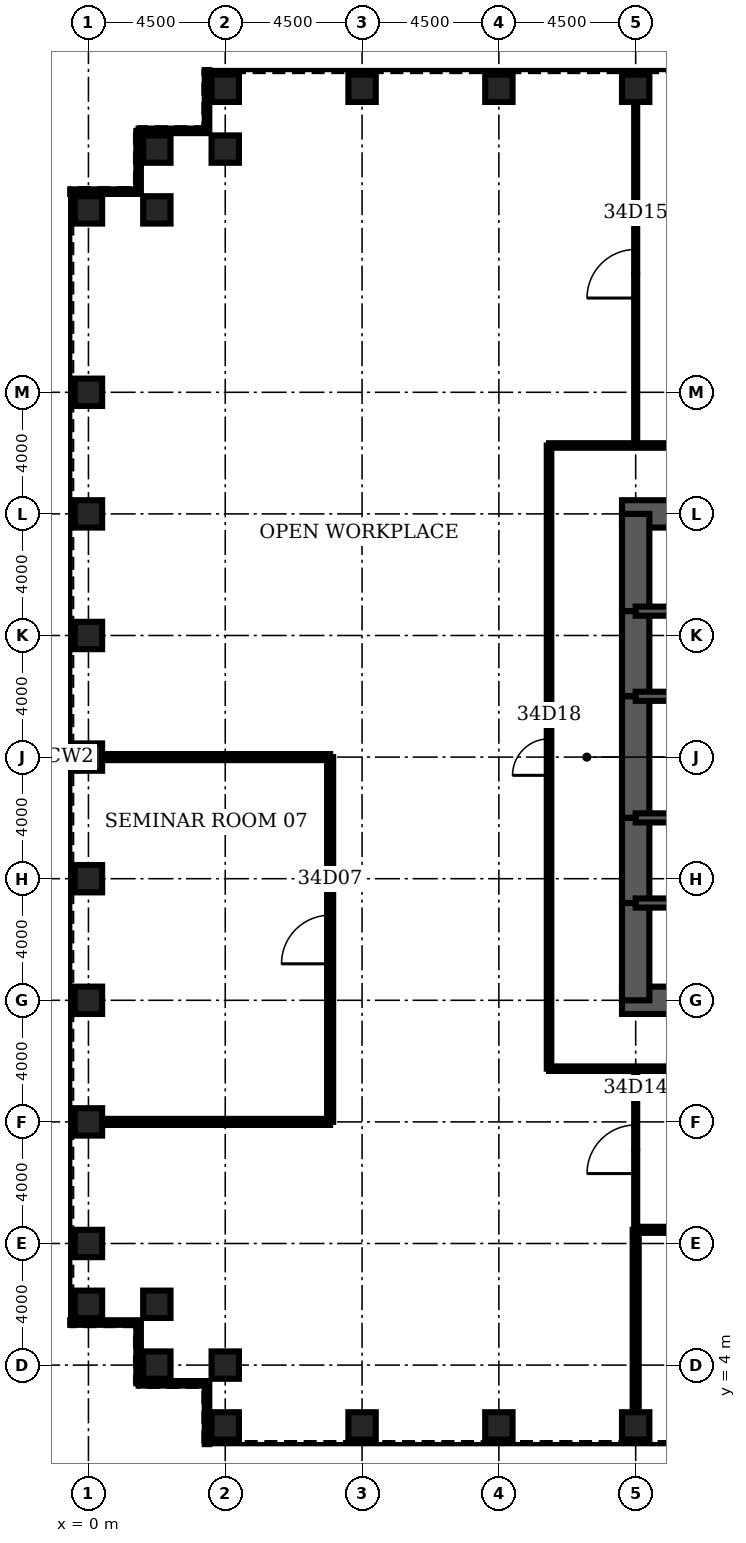
"""IFC4 building model, lengths in metres.
Left out: names, types, materials, properties, quantities, classifications, styles, units other than length and angle.
Written with IfcOpenShell. Run it as: python <this file> out.ifc"""

import sys

from ifc_helpers import new_model, si_unit, direction, frame, frame_2d, origin, origin_2d, place, context, subcontext, project, spatial, rectangle, hollow_rectangle, extrude, element, fill, save


model = new_model("IFC4")
c1 = context("Model", 3, precision=1e-05, world=origin(), true_north=direction((0.0, 1.0)))
c2 = subcontext(c1, "Body", "Model", "MODEL_VIEW")
j1 = project(units=[si_unit("LENGTHUNIT", "METRE"), si_unit("PLANEANGLEUNIT", "RADIAN")], contexts=[c1])
p1 = place(None, origin())
s1 = spatial("IfcSite", under=j1, at=p1, CompositionType="ELEMENT")
p2 = place(p1, origin())
s2 = spatial("IfcBuilding", under=s1, at=p2, CompositionType="ELEMENT")
p3 = place(p2, frame((0.0, 0.0, 155.1)))
s3 = spatial("IfcBuildingStorey", under=s2, at=p3, CompositionType="ELEMENT", Elevation=155.1)
for number, where, z_axis, x_axis in (
    (1, (4.5, 2.0, 0.0), (0.0, 0.0, 1.0), (0.0, 1.0, 0.0)),
    (2, (9.0, 2.0, 0.0), (0.0, 0.0, 1.0), (0.0, 1.0, 0.0)),
    (3, (13.5, 2.0, 0.0), (0.0, 0.0, 1.0), (0.0, 1.0, 0.0)),
    (4, (18.0, 2.0, 0.0), (0.0, 0.0, 1.0), (0.0, 1.0, 0.0)),
    (5, (18.0, 46.0, 0.0), (0.0, 0.0, 1.0), (0.0, 1.0, 0.0)),
    (6, (13.5, 46.0, 0.0), (0.0, 0.0, 1.0), (0.0, 1.0, 0.0)),
    (7, (9.0, 46.0, 0.0), (0.0, 0.0, 1.0), (0.0, 1.0, 0.0)),
    (8, (4.5, 46.0, 0.0), (0.0, 0.0, 1.0), (0.0, 1.0, 0.0)),
    (9, (4.5, 44.0, 0.0), (0.0, 0.0, 1.0), (0.0, 1.0, 0.0)),
    (10, (2.25, 44.0, 0.0), (0.0, 0.0, 1.0), (1.0, 0.0, 0.0)),
    (11, (2.25, 42.0, 0.0), (0.0, 0.0, 1.0), (1.0, 0.0, 0.0)),
    (12, (0.0, 42.0, 0.0), (0.0, 0.0, 1.0), (1.0, 0.0, 0.0)),
    (13, (0.0, 36.0, 0.0), (0.0, 0.0, 1.0), (1.0, 0.0, 0.0)),
    (14, (0.0, 32.0, 0.0), (0.0, 0.0, 1.0), (1.0, 0.0, 0.0)),
    (15, (0.0, 28.0, 0.0), (0.0, 0.0, 1.0), (1.0, 0.0, 0.0)),
    (16, (0.0, 24.0, 0.0), (0.0, 0.0, 1.0), (1.0, 0.0, 0.0)),
    (17, (0.0, 20.0, 0.0), (0.0, 0.0, 1.0), (1.0, 0.0, 0.0)),
    (18, (0.0, 16.0, 0.0), (0.0, 0.0, 1.0), (1.0, 0.0, 0.0)),
    (19, (0.0, 12.0, 0.0), (0.0, 0.0, 1.0), (1.0, 0.0, 0.0)),
    (20, (0.0, 8.0, 0.0), (0.0, 0.0, 1.0), (1.0, 0.0, 0.0)),
    (21, (0.0, 6.0, 0.0), (0.0, 0.0, 1.0), (1.0, 0.0, 0.0)),
    (22, (2.25, 6.0, 0.0), (0.0, 0.0, 1.0), (1.0, 0.0, 0.0)),
    (23, (2.25, 4.0, 0.0), (0.0, 0.0, 1.0), (1.0, 0.0, 0.0)),
    (24, (4.5, 4.0, 0.0), (0.0, 0.0, 1.0), (0.0, 1.0, 0.0)),
):
    element("IfcColumn", number, at=place(p3, frame(where, z_axis=z_axis, x_axis=x_axis)), inside=s3, PredefinedType="COLUMN", context=c2, shape_type="SweptSolid", body=[
        extrude(hollow_rectangle(XDim=0.9, YDim=0.9, WallThickness=0.1, at=origin_2d()), origin(), (0.0, 0.0, 1.0), 4.2),
    ])
for number, where, z_axis, x_axis in (
    (25, (17.55, 16.0, 0.0), (0.0, 0.0, 1.0), (1.0, 0.0, 0.0)),
    (26, (27.0, 32.0, 0.0), (0.0, 0.0, 1.0), (-1.0, 0.0, 0.0)),
):
    element("IfcWall", number, at=place(p3, frame(where, z_axis=z_axis, x_axis=x_axis)), inside=s3, PredefinedType="SHEAR", context=c2, shape_type="SweptSolid", body=[
        extrude(rectangle(XDim=9.45, YDim=0.9, at=frame_2d((4.725, 0.0))), origin(), (0.0, 0.0, 1.0), 4.2),
    ])
p4 = place(p3, frame((18.0, 32.0, 0.0), z_axis=(0.0, 0.0, 1.0), x_axis=(0.0, -1.0, 0.0)))
e27 = element("IfcWall", 27, at=p4, inside=s3, PredefinedType="SHEAR", context=c2, shape_type="SweptSolid", body=[
    extrude(rectangle(XDim=3.2, YDim=0.9, at=frame_2d((1.6, 0.0))), origin(), (0.0, 0.0, 1.0), 4.2),
])
p5 = place(p3, frame((18.0, 28.8, 0.0), z_axis=(0.0, 0.0, 1.0), x_axis=(0.0, -1.0, 0.0)))
e28 = element("IfcWall", 28, at=p5, inside=s3, PredefinedType="SHEAR", context=c2, shape_type="SweptSolid", body=[
    extrude(rectangle(XDim=2.8, YDim=0.9, at=frame_2d((1.4, 0.0))), origin(), (0.0, 0.0, 1.0), 4.2),
])
p6 = place(p5, frame((0.4, 0.0, 0.0)))
e29 = element("IfcOpeningElement", 29, at=p6, cuts=e28, PredefinedType="OPENING", context=c2, shape_type="SweptSolid", body=[
    extrude(rectangle(XDim=1.8, YDim=2.1, at=frame_2d((0.9, 1.05))), frame((0.0, 0.46, 0.0), z_axis=(0.0, -1.0, 0.0), x_axis=(1.0, 0.0, 0.0)), (0.0, 0.0, 1.0), 0.92),
])
p7 = place(p3, frame((18.0, 26.0, 0.0), z_axis=(0.0, 0.0, 1.0), x_axis=(0.0, -1.0, 0.0)))
e30 = element("IfcWall", 30, at=p7, inside=s3, PredefinedType="SHEAR", context=c2, shape_type="SweptSolid", body=[
    extrude(rectangle(XDim=4.0, YDim=0.9, at=frame_2d((2.0, 0.0))), origin(), (0.0, 0.0, 1.0), 4.2),
])
p8 = place(p3, frame((18.0, 22.0, 0.0), z_axis=(0.0, 0.0, 1.0), x_axis=(0.0, -1.0, 0.0)))
e31 = element("IfcWall", 31, at=p8, inside=s3, PredefinedType="SHEAR", context=c2, shape_type="SweptSolid", body=[
    extrude(rectangle(XDim=2.8, YDim=0.9, at=frame_2d((1.4, 0.0))), origin(), (0.0, 0.0, 1.0), 4.2),
])
p9 = place(p8, frame((0.6, 0.0, 0.0)))
e32 = element("IfcOpeningElement", 32, at=p9, cuts=e31, PredefinedType="OPENING", context=c2, shape_type="SweptSolid", body=[
    extrude(rectangle(XDim=1.8, YDim=2.1, at=frame_2d((0.9, 1.05))), frame((0.0, 0.46, 0.0), z_axis=(0.0, -1.0, 0.0), x_axis=(1.0, 0.0, 0.0)), (0.0, 0.0, 1.0), 0.92),
])
p10 = place(p3, frame((18.0, 19.2, 0.0), z_axis=(0.0, 0.0, 1.0), x_axis=(0.0, -1.0, 0.0)))
e33 = element("IfcWall", 33, at=p10, inside=s3, PredefinedType="SHEAR", context=c2, shape_type="SweptSolid", body=[
    extrude(rectangle(XDim=3.2, YDim=0.9, at=frame_2d((1.6, 0.0))), origin(), (0.0, 0.0, 1.0), 4.2),
])
p11 = place(p3, frame((18.0, 19.2, 0.0), z_axis=(0.0, 0.0, 1.0), x_axis=(1.0, 0.0, 0.0)))
e34 = element("IfcWall", 34, at=p11, inside=s3, PredefinedType="SOLIDWALL", context=c2, shape_type="SweptSolid", body=[
    extrude(rectangle(XDim=9.0, YDim=0.3, at=frame_2d((4.5, 0.0))), origin(), (0.0, 0.0, 1.0), 4.2),
])
p12 = place(p11, frame((0.65, 0.0, 0.0)))
e35 = element("IfcOpeningElement", 35, at=p12, cuts=e34, PredefinedType="OPENING", context=c2, shape_type="SweptSolid", body=[
    extrude(rectangle(XDim=1.0, YDim=2.1, at=frame_2d((0.5, 1.05))), frame((0.0, 0.16, 0.0), z_axis=(0.0, -1.0, 0.0), x_axis=(1.0, 0.0, 0.0)), (0.0, 0.0, 1.0), 0.32),
])
p13 = place(p3, frame((18.0, 28.8, 0.0), z_axis=(0.0, 0.0, 1.0), x_axis=(1.0, 0.0, 0.0)))
e36 = element("IfcWall", 36, at=p13, inside=s3, PredefinedType="SOLIDWALL", context=c2, shape_type="SweptSolid", body=[
    extrude(rectangle(XDim=9.0, YDim=0.3, at=frame_2d((4.5, 0.0))), origin(), (0.0, 0.0, 1.0), 4.2),
])
p14 = place(p13, frame((0.65, 0.0, 0.0)))
e37 = element("IfcOpeningElement", 37, at=p14, cuts=e36, PredefinedType="OPENING", context=c2, shape_type="SweptSolid", body=[
    extrude(rectangle(XDim=1.0, YDim=2.1, at=frame_2d((0.5, 1.05))), frame((0.0, 0.16, 0.0), z_axis=(0.0, -1.0, 0.0), x_axis=(1.0, 0.0, 0.0)), (0.0, 0.0, 1.0), 0.32),
])
p15 = place(p3, frame((18.0, 22.0, 0.0), z_axis=(0.0, 0.0, 1.0), x_axis=(1.0, 0.0, 0.0)))
e38 = element("IfcWall", 38, at=p15, inside=s3, PredefinedType="SOLIDWALL", context=c2, shape_type="SweptSolid", body=[
    extrude(rectangle(XDim=6.0, YDim=0.3, at=frame_2d((3.0, 0.0))), origin(), (0.0, 0.0, 1.0), 4.2),
])
p16 = place(p15, frame((2.0, 0.0, 0.0)))
e39 = element("IfcOpeningElement", 39, at=p16, cuts=e38, PredefinedType="OPENING", context=c2, shape_type="SweptSolid", body=[
    extrude(rectangle(XDim=1.0, YDim=2.1, at=frame_2d((0.5, 1.05))), frame((0.0, 0.16, 0.0), z_axis=(0.0, -1.0, 0.0), x_axis=(1.0, 0.0, 0.0)), (0.0, 0.0, 1.0), 0.32),
])
p17 = place(p3, frame((18.0, 26.0, 0.0), z_axis=(0.0, 0.0, 1.0), x_axis=(1.0, 0.0, 0.0)))
e40 = element("IfcWall", 40, at=p17, inside=s3, PredefinedType="SOLIDWALL", context=c2, shape_type="SweptSolid", body=[
    extrude(rectangle(XDim=6.0, YDim=0.3, at=frame_2d((3.0, 0.0))), origin(), (0.0, 0.0, 1.0), 4.2),
])
p18 = place(p3, frame((18.0, 8.45, 0.0), z_axis=(0.0, 0.0, 1.0), x_axis=(1.0, 0.0, 0.0)))
e41 = element("IfcWall", 41, at=p18, inside=s3, PredefinedType="PARTITIONING", context=c2, shape_type="SweptSolid", body=[
    extrude(rectangle(XDim=36.0, YDim=0.2, at=frame_2d((18.0, 0.0))), origin(), (0.0, 0.0, 1.0), 3.0),
])
p19 = place(p18, frame((3.7, 0.0, 0.0)))
e42 = element("IfcOpeningElement", 42, at=p19, cuts=e41, PredefinedType="OPENING", context=c2, shape_type="SweptSolid", body=[
    extrude(rectangle(XDim=1.6, YDim=2.1, at=frame_2d((0.8, 1.05))), frame((0.0, 0.11, 0.0), z_axis=(0.0, -1.0, 0.0), x_axis=(1.0, 0.0, 0.0)), (0.0, 0.0, 1.0), 0.22),
])
p20 = place(p18, frame((12.7, 0.0, 0.0)))
e43 = element("IfcOpeningElement", 43, at=p20, cuts=e41, PredefinedType="OPENING", context=c2, shape_type="SweptSolid", body=[
    extrude(rectangle(XDim=1.6, YDim=2.1, at=frame_2d((0.8, 1.05))), frame((0.0, 0.11, 0.0), z_axis=(0.0, -1.0, 0.0), x_axis=(1.0, 0.0, 0.0)), (0.0, 0.0, 1.0), 0.22),
])
p21 = place(p18, frame((21.7, 0.0, 0.0)))
e44 = element("IfcOpeningElement", 44, at=p21, cuts=e41, PredefinedType="OPENING", context=c2, shape_type="SweptSolid", body=[
    extrude(rectangle(XDim=1.6, YDim=2.1, at=frame_2d((0.8, 1.05))), frame((0.0, 0.11, 0.0), z_axis=(0.0, -1.0, 0.0), x_axis=(1.0, 0.0, 0.0)), (0.0, 0.0, 1.0), 0.22),
])
p22 = place(p18, frame((30.7, 0.0, 0.0)))
e45 = element("IfcOpeningElement", 45, at=p22, cuts=e41, PredefinedType="OPENING", context=c2, shape_type="SweptSolid", body=[
    extrude(rectangle(XDim=1.6, YDim=2.1, at=frame_2d((0.8, 1.05))), frame((0.0, 0.11, 0.0), z_axis=(0.0, -1.0, 0.0), x_axis=(1.0, 0.0, 0.0)), (0.0, 0.0, 1.0), 0.22),
])
p23 = place(p3, frame((0.45, 12.0, 0.0), z_axis=(0.0, 0.0, 1.0), x_axis=(1.0, 0.0, 0.0)))
e46 = element("IfcWall", 46, at=p23, inside=s3, PredefinedType="PARTITIONING", context=c2, shape_type="SweptSolid", body=[
    extrude(rectangle(XDim=7.5, YDim=0.2, at=frame_2d((3.75, 0.0))), origin(), (0.0, 0.0, 1.0), 3.0),
])
p24 = place(p3, frame((15.15, 13.75, 0.0), z_axis=(0.0, 0.0, 1.0), x_axis=(1.0, 0.0, 0.0)))
e47 = element("IfcWall", 47, at=p24, inside=s3, PredefinedType="PARTITIONING", context=c2, shape_type="SweptSolid", body=[
    extrude(rectangle(XDim=41.7, YDim=0.15, at=frame_2d((20.85, 0.0))), origin(), (0.0, 0.0, 1.0), 3.0),
])
p25 = place(p24, frame((18.75, 0.0, 0.0)))
e48 = element("IfcOpeningElement", 48, at=p25, cuts=e47, PredefinedType="OPENING", context=c2, shape_type="SweptSolid", body=[
    extrude(rectangle(XDim=1.2, YDim=2.1, at=frame_2d((0.6, 1.05))), frame((0.0, 0.085, 0.0), z_axis=(0.0, -1.0, 0.0), x_axis=(1.0, 0.0, 0.0)), (0.0, 0.0, 1.0), 0.17),
])
p26 = place(p3, frame((0.45, 24.0, 0.0), z_axis=(0.0, 0.0, 1.0), x_axis=(1.0, 0.0, 0.0)))
e49 = element("IfcWall", 49, at=p26, inside=s3, PredefinedType="PARTITIONING", context=c2, shape_type="SweptSolid", body=[
    extrude(rectangle(XDim=7.5, YDim=0.2, at=frame_2d((3.75, 0.0))), origin(), (0.0, 0.0, 1.0), 3.0),
])
p27 = place(p3, frame((15.15, 34.25, 0.0), z_axis=(0.0, 0.0, 1.0), x_axis=(1.0, 0.0, 0.0)))
e50 = element("IfcWall", 50, at=p27, inside=s3, PredefinedType="PARTITIONING", context=c2, shape_type="SweptSolid", body=[
    extrude(rectangle(XDim=41.7, YDim=0.15, at=frame_2d((20.85, 0.0))), origin(), (0.0, 0.0, 1.0), 3.0),
])
p28 = place(p27, frame((20.25, 0.0, 0.0)))
e51 = element("IfcOpeningElement", 51, at=p28, cuts=e50, PredefinedType="OPENING", context=c2, shape_type="SweptSolid", body=[
    extrude(rectangle(XDim=1.2, YDim=2.1, at=frame_2d((0.6, 1.05))), frame((0.0, 0.085, 0.0), z_axis=(0.0, -1.0, 0.0), x_axis=(1.0, 0.0, 0.0)), (0.0, 0.0, 1.0), 0.17),
])
p29 = place(p3, frame((7.95, 12.0, 0.0), z_axis=(0.0, 0.0, 1.0), x_axis=(0.0, 1.0, 0.0)))
e52 = element("IfcWall", 52, at=p29, inside=s3, PredefinedType="PARTITIONING", context=c2, shape_type="SweptSolid", body=[
    extrude(rectangle(XDim=12.0, YDim=0.2, at=frame_2d((6.0, 0.0))), origin(), (0.0, 0.0, 1.0), 3.0),
])
p30 = place(p29, frame((5.2, 0.0, 0.0)))
e53 = element("IfcOpeningElement", 53, at=p30, cuts=e52, PredefinedType="OPENING", context=c2, shape_type="SweptSolid", body=[
    extrude(rectangle(XDim=1.6, YDim=2.1, at=frame_2d((0.8, 1.05))), frame((0.0, 0.11, 0.0), z_axis=(0.0, -1.0, 0.0), x_axis=(1.0, 0.0, 0.0)), (0.0, 0.0, 1.0), 0.22),
])
p31 = place(p3, frame((15.15, 13.75, 0.0), z_axis=(0.0, 0.0, 1.0), x_axis=(0.0, 1.0, 0.0)))
e54 = element("IfcWall", 54, at=p31, inside=s3, PredefinedType="PARTITIONING", context=c2, shape_type="SweptSolid", body=[
    extrude(rectangle(XDim=20.5, YDim=0.15, at=frame_2d((10.25, 0.0))), origin(), (0.0, 0.0, 1.0), 3.0),
])
p32 = place(p31, frame((9.65, 0.0, 0.0)))
e55 = element("IfcOpeningElement", 55, at=p32, cuts=e54, PredefinedType="OPENING", context=c2, shape_type="SweptSolid", body=[
    extrude(rectangle(XDim=1.2, YDim=2.1, at=frame_2d((0.6, 1.05))), frame((0.0, 0.085, 0.0), z_axis=(0.0, -1.0, 0.0), x_axis=(1.0, 0.0, 0.0)), (0.0, 0.0, 1.0), 0.17),
])
p33 = place(p3, frame((18.0, 2.45, 0.0), z_axis=(0.0, 0.0, 1.0), x_axis=(0.0, 1.0, 0.0)))
e56 = element("IfcWall", 56, at=p33, inside=s3, PredefinedType="PARTITIONING", context=c2, shape_type="SweptSolid", body=[
    extrude(rectangle(XDim=6.0, YDim=0.2, at=frame_2d((3.0, 0.0))), origin(), (0.0, 0.0, 1.0), 3.0),
])
p34 = place(p3, frame((18.0, 8.45, 0.0), z_axis=(0.0, 0.0, 1.0), x_axis=(0.0, 1.0, 0.0)))
e57 = element("IfcWall", 57, at=p34, inside=s3, PredefinedType="PARTITIONING", context=c2, shape_type="SweptSolid", body=[
    extrude(rectangle(XDim=5.3, YDim=0.1, at=frame_2d((2.65, 0.0))), origin(), (0.0, 0.0, 1.0), 3.0),
])
p35 = place(p34, frame((1.85, 0.0, 0.0)))
e58 = element("IfcOpeningElement", 58, at=p35, cuts=e57, PredefinedType="OPENING", context=c2, shape_type="SweptSolid", body=[
    extrude(rectangle(XDim=1.6, YDim=2.1, at=frame_2d((0.8, 1.05))), frame((0.0, 0.06, 0.0), z_axis=(0.0, -1.0, 0.0), x_axis=(1.0, 0.0, 0.0)), (0.0, 0.0, 1.0), 0.12),
])
p36 = place(p3, frame((18.0, 34.25, 0.0), z_axis=(0.0, 0.0, 1.0), x_axis=(0.0, 1.0, 0.0)))
e59 = element("IfcWall", 59, at=p36, inside=s3, PredefinedType="PARTITIONING", context=c2, shape_type="SweptSolid", body=[
    extrude(rectangle(XDim=11.3, YDim=0.1, at=frame_2d((5.65, 0.0))), origin(), (0.0, 0.0, 1.0), 3.0),
])
p37 = place(p36, frame((4.85, 0.0, 0.0)))
e60 = element("IfcOpeningElement", 60, at=p37, cuts=e59, PredefinedType="OPENING", context=c2, shape_type="SweptSolid", body=[
    extrude(rectangle(XDim=1.6, YDim=2.1, at=frame_2d((0.8, 1.05))), frame((0.0, 0.06, 0.0), z_axis=(0.0, -1.0, 0.0), x_axis=(1.0, 0.0, 0.0)), (0.0, 0.0, 1.0), 0.12),
])
p38 = place(p3, frame((3.9, 46.6, 0.0), z_axis=(0.0, 0.0, 1.0), x_axis=(0.0, -1.0, 0.0)))
e61 = element("IfcWall", 61, at=p38, inside=s3, PredefinedType="ELEMENTEDWALL", context=c2, shape_type="SweptSolid", body=[
    extrude(rectangle(XDim=2.0, YDim=0.15, at=frame_2d((1.0, 0.0))), origin(), (0.0, 0.0, 1.0), 4.04),
])
p39 = place(p3, frame((3.9, 44.6, 0.0), z_axis=(0.0, 0.0, 1.0), x_axis=(-1.0, 0.0, 0.0)))
e62 = element("IfcWall", 62, at=p39, inside=s3, PredefinedType="ELEMENTEDWALL", context=c2, shape_type="SweptSolid", body=[
    extrude(rectangle(XDim=2.25, YDim=0.15, at=frame_2d((1.125, 0.0))), origin(), (0.0, 0.0, 1.0), 4.04),
])
p40 = place(p3, frame((1.65, 44.6, 0.0), z_axis=(0.0, 0.0, 1.0), x_axis=(0.0, -1.0, 0.0)))
e63 = element("IfcWall", 63, at=p40, inside=s3, PredefinedType="ELEMENTEDWALL", context=c2, shape_type="SweptSolid", body=[
    extrude(rectangle(XDim=2.0, YDim=0.15, at=frame_2d((1.0, 0.0))), origin(), (0.0, 0.0, 1.0), 4.04),
])
for number, where, z_axis, x_axis in (
    (64, (1.65, 42.6, 0.0), (0.0, 0.0, 1.0), (-1.0, 0.0, 0.0)),
    (65, (-0.6, 5.4, 0.0), (0.0, 0.0, 1.0), (1.0, 0.0, 0.0)),
):
    element("IfcWall", number, at=place(p3, frame(where, z_axis=z_axis, x_axis=x_axis)), inside=s3, PredefinedType="ELEMENTEDWALL", context=c2, shape_type="SweptSolid", body=[
        extrude(rectangle(XDim=2.25, YDim=0.15, at=frame_2d((1.125, 0.0))), origin(), (0.0, 0.0, 1.0), 4.04),
    ])
p41 = place(p3, frame((1.65, 5.4, 0.0), z_axis=(0.0, 0.0, 1.0), x_axis=(0.0, -1.0, 0.0)))
e66 = element("IfcWall", 66, at=p41, inside=s3, PredefinedType="ELEMENTEDWALL", context=c2, shape_type="SweptSolid", body=[
    extrude(rectangle(XDim=2.0, YDim=0.15, at=frame_2d((1.0, 0.0))), origin(), (0.0, 0.0, 1.0), 4.04),
])
p42 = place(p3, frame((1.65, 3.4, 0.0), z_axis=(0.0, 0.0, 1.0), x_axis=(1.0, 0.0, 0.0)))
e67 = element("IfcWall", 67, at=p42, inside=s3, PredefinedType="ELEMENTEDWALL", context=c2, shape_type="SweptSolid", body=[
    extrude(rectangle(XDim=2.25, YDim=0.15, at=frame_2d((1.125, 0.0))), origin(), (0.0, 0.0, 1.0), 4.04),
])
p43 = place(p3, frame((3.9, 3.4, 0.0), z_axis=(0.0, 0.0, 1.0), x_axis=(0.0, -1.0, 0.0)))
e68 = element("IfcWall", 68, at=p43, inside=s3, PredefinedType="ELEMENTEDWALL", context=c2, shape_type="SweptSolid", body=[
    extrude(rectangle(XDim=2.0, YDim=0.15, at=frame_2d((1.0, 0.0))), origin(), (0.0, 0.0, 1.0), 4.04),
])
p44 = place(p30, origin())
e69 = element("IfcDoor", 69, at=p44, inside=s3, OperationType="SINGLE_SWING_LEFT", PredefinedType="DOOR", context=c2, shape_type="SweptSolid", body=[
    extrude(rectangle(XDim=1.6, YDim=2.1, at=frame_2d((0.8, 1.05))), frame((0.0, 0.025, 0.0), z_axis=(0.0, -1.0, 0.0), x_axis=(1.0, 0.0, 0.0)), (0.0, 0.0, 1.0), 0.05),
])
fill(e53, e69)
p45 = place(p35, origin())
e70 = element("IfcDoor", 70, at=p45, inside=s3, OperationType="SINGLE_SWING_LEFT", PredefinedType="DOOR", context=c2, shape_type="SweptSolid", body=[
    extrude(rectangle(XDim=1.6, YDim=2.1, at=frame_2d((0.8, 1.05))), frame((0.0, 0.025, 0.0), z_axis=(0.0, -1.0, 0.0), x_axis=(1.0, 0.0, 0.0)), (0.0, 0.0, 1.0), 0.05),
])
fill(e58, e70)
p46 = place(p37, origin())
e71 = element("IfcDoor", 71, at=p46, inside=s3, OperationType="SINGLE_SWING_LEFT", PredefinedType="DOOR", context=c2, shape_type="SweptSolid", body=[
    extrude(rectangle(XDim=1.6, YDim=2.1, at=frame_2d((0.8, 1.05))), frame((0.0, 0.025, 0.0), z_axis=(0.0, -1.0, 0.0), x_axis=(1.0, 0.0, 0.0)), (0.0, 0.0, 1.0), 0.05),
])
fill(e60, e71)
p47 = place(p32, origin())
e72 = element("IfcDoor", 72, at=p47, inside=s3, OperationType="SINGLE_SWING_LEFT", PredefinedType="DOOR", context=c2, shape_type="SweptSolid", body=[
    extrude(rectangle(XDim=1.2, YDim=2.1, at=frame_2d((0.6, 1.05))), frame((0.0, 0.025, 0.0), z_axis=(0.0, -1.0, 0.0), x_axis=(1.0, 0.0, 0.0)), (0.0, 0.0, 1.0), 0.05),
])
fill(e55, e72)
p48 = place(p12, origin())
e73 = element("IfcDoor", 73, at=p48, inside=s3, OperationType="SINGLE_SWING_LEFT", PredefinedType="DOOR", context=c2, shape_type="SweptSolid", body=[
    extrude(rectangle(XDim=1.0, YDim=2.1, at=frame_2d((0.5, 1.05))), frame((0.0, 0.025, 0.0), z_axis=(0.0, -1.0, 0.0), x_axis=(1.0, 0.0, 0.0)), (0.0, 0.0, 1.0), 0.05),
])
fill(e35, e73)
p49 = place(p14, origin())
e74 = element("IfcDoor", 74, at=p49, inside=s3, OperationType="SINGLE_SWING_LEFT", PredefinedType="DOOR", context=c2, shape_type="SweptSolid", body=[
    extrude(rectangle(XDim=1.0, YDim=2.1, at=frame_2d((0.5, 1.05))), frame((0.0, 0.025, 0.0), z_axis=(0.0, -1.0, 0.0), x_axis=(1.0, 0.0, 0.0)), (0.0, 0.0, 1.0), 0.05),
])
fill(e37, e74)
p50 = place(p9, origin())
e75 = element("IfcDoor", 75, at=p50, inside=s3, OperationType="SINGLE_SWING_LEFT", PredefinedType="DOOR", context=c2, shape_type="SweptSolid", body=[
    extrude(rectangle(XDim=1.8, YDim=2.1, at=frame_2d((0.9, 1.05))), frame((0.0, 0.45, 0.0), z_axis=(0.0, -1.0, 0.0), x_axis=(1.0, 0.0, 0.0)), (0.0, 0.0, 1.0), 0.899),
])
fill(e32, e75)
p51 = place(p6, origin())
e76 = element("IfcDoor", 76, at=p51, inside=s3, OperationType="SINGLE_SWING_LEFT", PredefinedType="DOOR", context=c2, shape_type="SweptSolid", body=[
    extrude(rectangle(XDim=1.8, YDim=2.1, at=frame_2d((0.9, 1.05))), frame((0.0, 0.45, 0.0), z_axis=(0.0, -1.0, 0.0), x_axis=(1.0, 0.0, 0.0)), (0.0, 0.0, 1.0), 0.899),
])
fill(e29, e76)
save(model, sys.argv[1])
